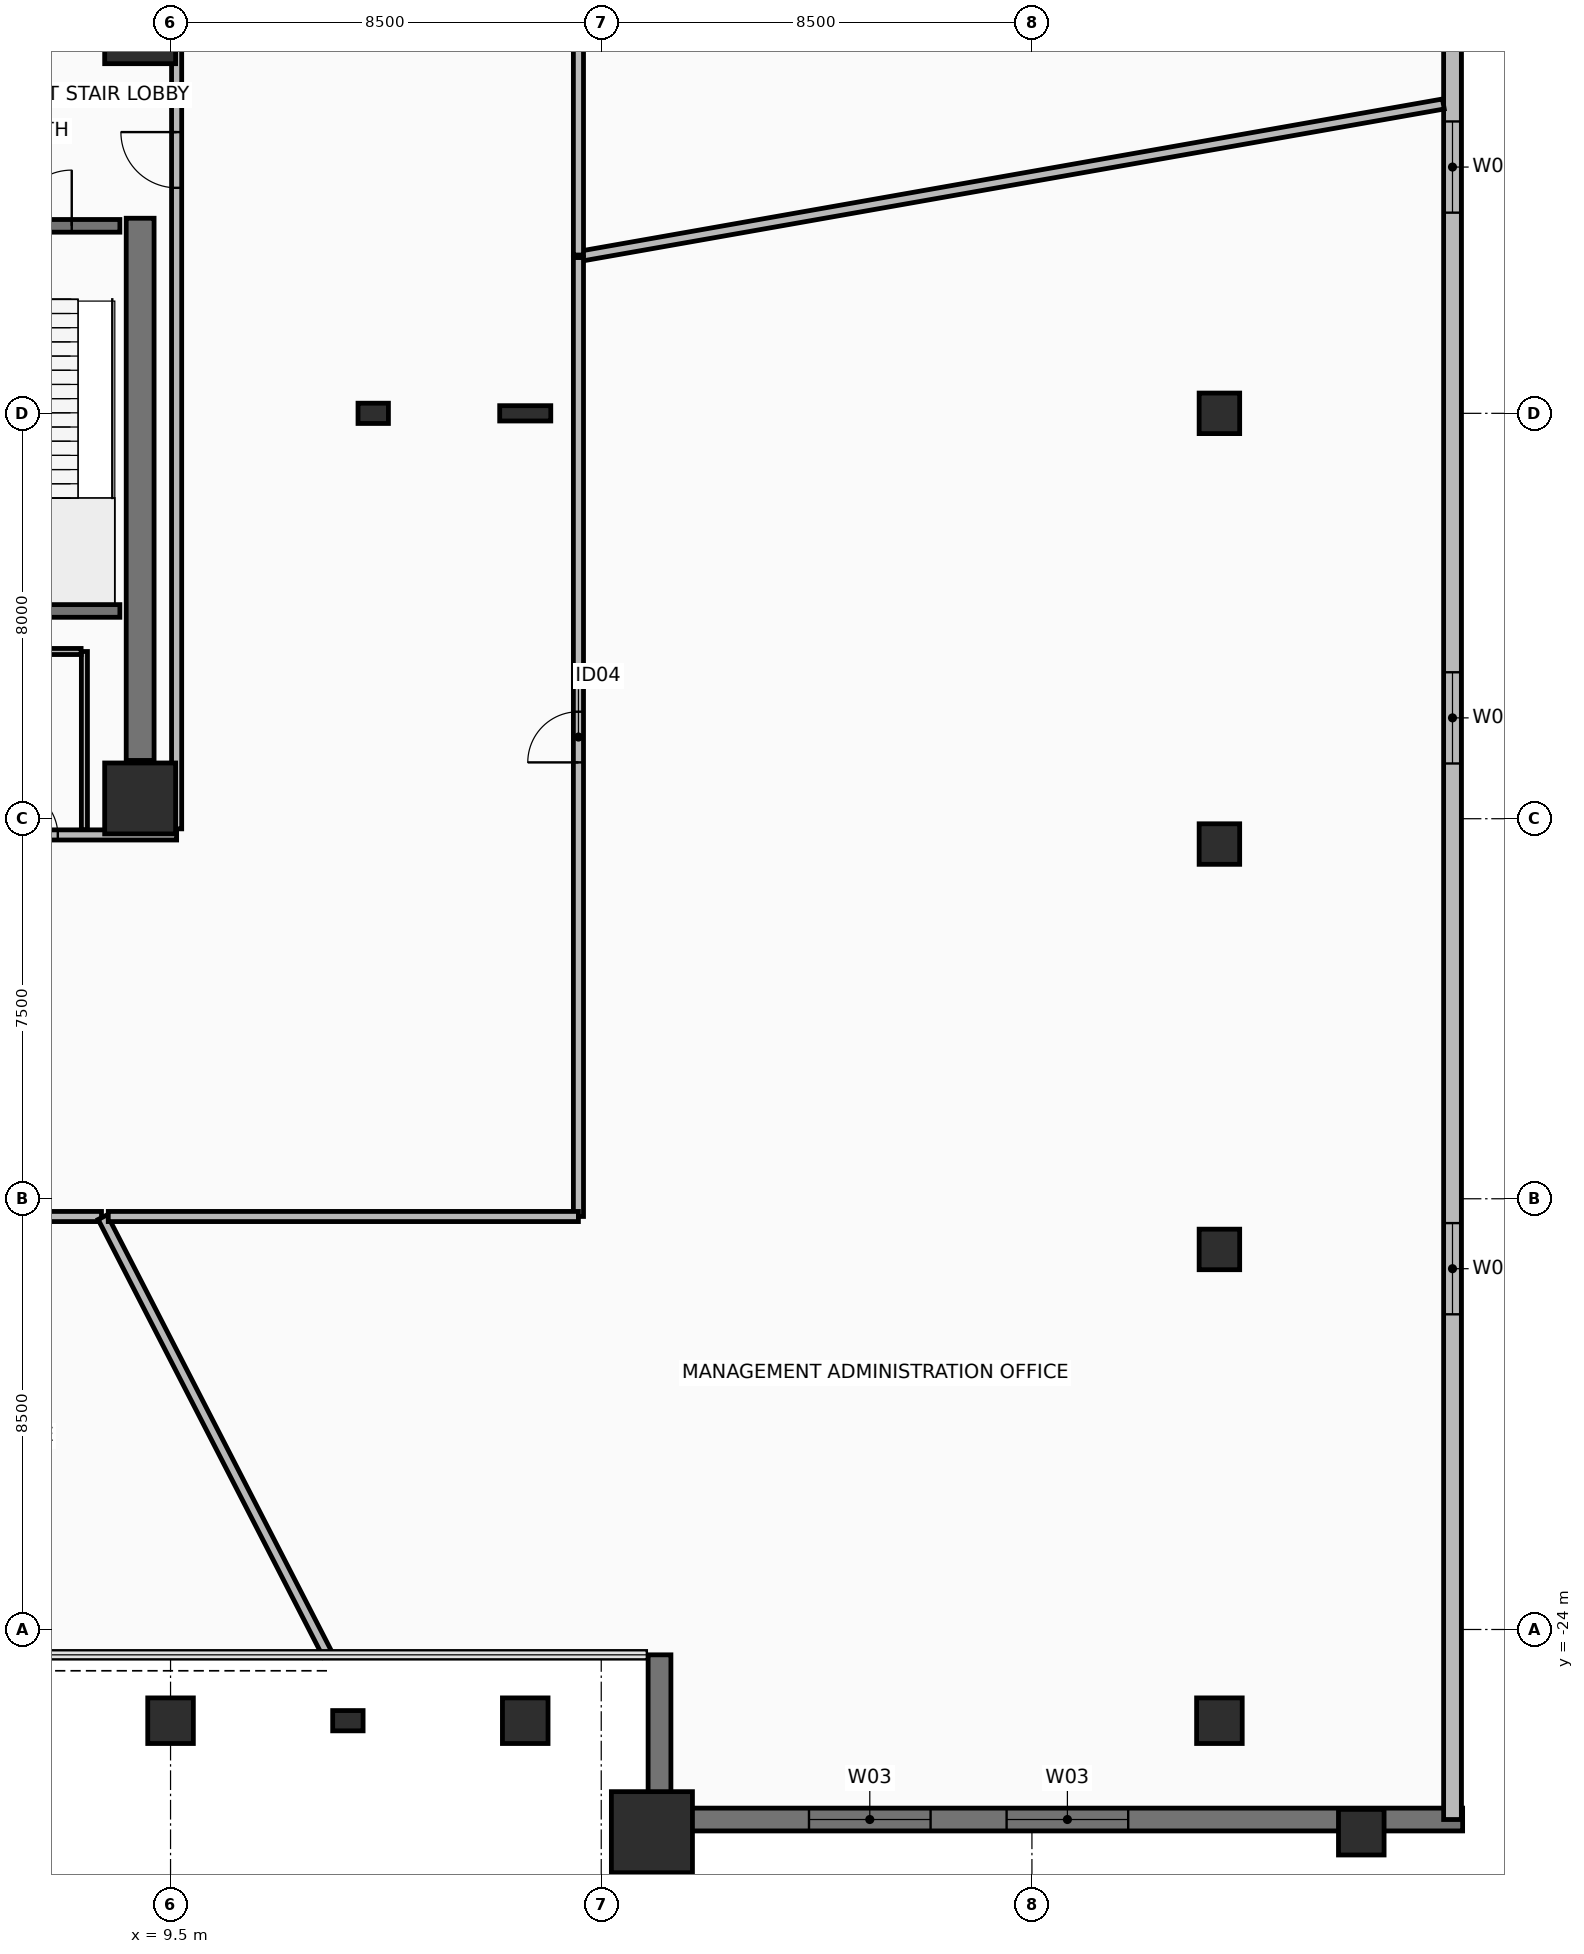
"""IFC4 building model, lengths in metres.
Left out: names, types, materials, properties, quantities, classifications, styles, units other than length and angle.
Written with IfcOpenShell. Run it as: python <this file> out.ifc"""

import sys

from ifc_helpers import new_model, si_unit, direction, frame, frame_2d, origin, origin_2d, place, context, subcontext, project, spatial, rectangle, hollow_rectangle, i_section, extrude, element, fill, save


model = new_model("IFC4")
c1 = context("Model", 3, precision=1e-05, world=origin(), true_north=direction((0.0, 1.0)))
c2 = subcontext(c1, "Body", "Model", "MODEL_VIEW")
j1 = project(units=[si_unit("LENGTHUNIT", "METRE"), si_unit("PLANEANGLEUNIT", "RADIAN")], contexts=[c1])
p1 = place(None, origin())
s1 = spatial("IfcSite", under=j1, at=p1, CompositionType="ELEMENT")
p2 = place(p1, origin())
s2 = spatial("IfcBuilding", under=s1, at=p2, CompositionType="ELEMENT")
p3 = place(p2, frame((0.0, 0.0, 5.5)))
s3 = spatial("IfcBuildingStorey", under=s2, at=p3, CompositionType="ELEMENT", Elevation=5.5)
for number, where, z_axis, x_axis in (
    (1, (8.9, -7.6, 0.0), (0.0, 0.0, 1.0), (1.0, 0.0, 0.0)),
    (2, (8.9, 7.6, 0.0), (0.0, 0.0, 1.0), (1.0, 0.0, 0.0)),
):
    element("IfcColumn", number, at=place(p3, frame(where, z_axis=z_axis, x_axis=x_axis)), inside=s3, PredefinedType="COLUMN", context=c2, shape_type="SweptSolid", body=[
        extrude(rectangle(XDim=1.4, YDim=1.4, at=origin_2d()), origin(), (0.0, 0.0, 1.0), 5.5),
    ])
for number, where, z_axis, x_axis in (
    (3, (13.5, 0.0, 0.0), (0.0, 0.0, 1.0), (1.0, 0.0, 0.0)),
    (4, (13.0, -25.8, 0.0), (0.0, 0.0, 1.0), (1.0, 0.0, 0.0)),
):
    element("IfcColumn", number, at=place(p3, frame(where, z_axis=z_axis, x_axis=x_axis)), inside=s3, PredefinedType="PILASTER", context=c2, shape_type="SweptSolid", body=[
        extrude(rectangle(XDim=0.6, YDim=0.4, at=origin_2d()), origin(), (0.0, 0.0, 1.0), 5.5),
    ])
for number, where, z_axis, x_axis in (
    (5, (9.5, -25.8, 0.0), (0.0, 0.0, 1.0), (1.0, 0.0, 0.0)),
    (6, (16.5, -25.8, 0.0), (0.0, 0.0, 1.0), (1.0, 0.0, 0.0)),
    (7, (30.2, -25.8, 0.0), (0.0, 0.0, 1.0), (1.0, 0.0, 0.0)),
):
    element("IfcColumn", number, at=place(p3, frame(where, z_axis=z_axis, x_axis=x_axis)), inside=s3, PredefinedType="COLUMN", context=c2, shape_type="SweptSolid", body=[
        extrude(hollow_rectangle(XDim=0.9, YDim=0.9, WallThickness=0.05, at=origin_2d()), origin(), (0.0, 0.0, 1.0), 5.5),
    ])
for number, where, z_axis, x_axis in (
    (8, (30.2, -16.5, 0.0), (0.0, 0.0, 1.0), (1.0, 0.0, 0.0)),
    (9, (30.2, -8.5, 0.0), (0.0, 0.0, 1.0), (1.0, 0.0, 0.0)),
    (10, (30.2, 0.0, 0.0), (0.0, 0.0, 1.0), (1.0, 0.0, 0.0)),
):
    element("IfcColumn", number, at=place(p3, frame(where, z_axis=z_axis, x_axis=x_axis)), inside=s3, PredefinedType="COLUMN", context=c2, shape_type="SweptSolid", body=[
        extrude(hollow_rectangle(XDim=0.8, YDim=0.8, WallThickness=0.045, at=origin_2d()), origin(), (0.0, 0.0, 1.0), 5.5),
    ])
p4 = place(p3, frame((16.5, 0.0, 0.0), z_axis=(0.0, 0.0, 1.0), x_axis=(1.0, 0.0, 0.0)))
e11 = element("IfcColumn", 11, at=p4, inside=s3, PredefinedType="COLUMN", context=c2, shape_type="SweptSolid", body=[
    extrude(i_section(OverallWidth=0.302, OverallDepth=1.008, WebThickness=0.021, FlangeThickness=0.04, at=origin_2d()), origin(), (0.0, 0.0, 1.0), 5.5),
])
p5 = place(p3, frame((19.0, -28.0, 0.0), z_axis=(0.0, 0.0, 1.0), x_axis=(1.0, 0.0, 0.0)))
e12 = element("IfcColumn", 12, at=p5, inside=s3, PredefinedType="COLUMN", context=c2, shape_type="SweptSolid", body=[
    extrude(rectangle(XDim=1.6, YDim=1.6, at=origin_2d()), origin(), (0.0, 0.0, 1.0), 5.5),
])
p6 = place(p3, frame((33.0, -28.0, 0.0), z_axis=(0.0, 0.0, 1.0), x_axis=(1.0, 0.0, 0.0)))
e13 = element("IfcColumn", 13, at=p6, inside=s3, PredefinedType="COLUMN", context=c2, shape_type="SweptSolid", body=[
    extrude(hollow_rectangle(XDim=0.9, YDim=0.9, WallThickness=0.05, at=origin_2d()), origin(), (0.0, 0.0, 1.0), 5.5),
])
p7 = place(p3, frame((19.4, -27.75, 0.0), z_axis=(0.0, 0.0, 1.0), x_axis=(1.0, 0.0, 0.0)))
e14 = element("IfcWall", 14, at=p7, inside=s3, PredefinedType="STANDARD", context=c2, shape_type="SweptSolid", body=[
    extrude(rectangle(XDim=15.6, YDim=0.45, at=frame_2d((7.8, 0.0))), origin(), (0.0, 0.0, 1.0), 5.22),
])
p8 = place(p7, frame((2.7, 0.0, 0.9)))
e15 = element("IfcOpeningElement", 15, at=p8, cuts=e14, PredefinedType="OPENING", context=c2, shape_type="SweptSolid", body=[
    extrude(rectangle(XDim=2.4, YDim=2.4, at=frame_2d((1.2, 1.2))), frame((0.0, 0.235, 0.0), z_axis=(0.0, -1.0, 0.0), x_axis=(1.0, 0.0, 0.0)), (0.0, 0.0, 1.0), 0.47),
])
p9 = place(p7, frame((6.6, 0.0, 0.9)))
e16 = element("IfcOpeningElement", 16, at=p9, cuts=e14, PredefinedType="OPENING", context=c2, shape_type="SweptSolid", body=[
    extrude(rectangle(XDim=2.4, YDim=2.4, at=frame_2d((1.2, 1.2))), frame((0.0, 0.235, 0.0), z_axis=(0.0, -1.0, 0.0), x_axis=(1.0, 0.0, 0.0)), (0.0, 0.0, 1.0), 0.47),
])
p10 = place(p3, frame((19.15, -24.5, 0.0), z_axis=(0.0, 0.0, 1.0), x_axis=(0.0, -1.0, 0.0)))
e17 = element("IfcWall", 17, at=p10, inside=s3, PredefinedType="STANDARD", context=c2, shape_type="SweptSolid", body=[
    extrude(rectangle(XDim=3.25, YDim=0.45, at=frame_2d((1.625, 0.0))), origin(), (0.0, 0.0, 1.0), 5.22),
])
p11 = place(p3, frame((34.8, -27.75, 0.0), z_axis=(0.0, 0.0, 1.0), x_axis=(0.0, 1.0, 0.0)))
e18 = element("IfcWall", 18, at=p11, inside=s3, PredefinedType="STANDARD", context=c2, shape_type="SweptSolid", body=[
    extrude(rectangle(XDim=54.35, YDim=0.35, at=frame_2d((27.175, 0.0))), origin(), (0.0, 0.0, 1.0), 5.22),
])
p12 = place(p11, frame((9.97, 0.0, 0.95)))
e19 = element("IfcOpeningElement", 19, at=p12, cuts=e18, PredefinedType="OPENING", context=c2, shape_type="SweptSolid", body=[
    extrude(rectangle(XDim=1.8, YDim=2.2, at=frame_2d((0.9, 1.1))), frame((0.0, 0.185, 0.0), z_axis=(0.0, -1.0, 0.0), x_axis=(1.0, 0.0, 0.0)), (0.0, 0.0, 1.0), 0.37),
])
p13 = place(p11, frame((20.84, 0.0, 0.95)))
e20 = element("IfcOpeningElement", 20, at=p13, cuts=e18, PredefinedType="OPENING", context=c2, shape_type="SweptSolid", body=[
    extrude(rectangle(XDim=1.8, YDim=2.2, at=frame_2d((0.9, 1.1))), frame((0.0, 0.185, 0.0), z_axis=(0.0, -1.0, 0.0), x_axis=(1.0, 0.0, 0.0)), (0.0, 0.0, 1.0), 0.37),
])
p14 = place(p11, frame((31.71, 0.0, 0.95)))
e21 = element("IfcOpeningElement", 21, at=p14, cuts=e18, PredefinedType="OPENING", context=c2, shape_type="SweptSolid", body=[
    extrude(rectangle(XDim=1.8, YDim=2.2, at=frame_2d((0.9, 1.1))), frame((0.0, 0.185, 0.0), z_axis=(0.0, -1.0, 0.0), x_axis=(1.0, 0.0, 0.0)), (0.0, 0.0, 1.0), 0.37),
])
p15 = place(p11, frame((42.58, 0.0, 0.95)))
e22 = element("IfcOpeningElement", 22, at=p15, cuts=e18, PredefinedType="OPENING", context=c2, shape_type="SweptSolid", body=[
    extrude(rectangle(XDim=1.8, YDim=2.2, at=frame_2d((0.9, 1.1))), frame((0.0, 0.185, 0.0), z_axis=(0.0, -1.0, 0.0), x_axis=(1.0, 0.0, 0.0)), (0.0, 0.0, 1.0), 0.37),
])
p16 = place(p3, frame((8.9, -6.85, 0.0), z_axis=(0.0, 0.0, 1.0), x_axis=(0.0, 1.0, 0.0)))
e23 = element("IfcWall", 23, at=p16, inside=s3, PredefinedType="SHEAR", context=c2, shape_type="SweptSolid", body=[
    extrude(rectangle(XDim=10.7, YDim=0.55, at=frame_2d((5.35, 0.0))), origin(), (0.0, 0.0, 1.0), 5.22),
])
p17 = place(p3, frame((-9.62, -8.32, 0.0), z_axis=(0.0, 0.0, 1.0), x_axis=(1.0, 0.0, 0.0)))
e24 = element("IfcWall", 24, at=p17, inside=s3, PredefinedType="PARTITIONING", context=c2, shape_type="SweptSolid", body=[
    extrude(rectangle(XDim=19.24, YDim=0.2, at=frame_2d((9.62, 0.0))), origin(), (0.0, 0.0, 1.0), 4.565),
])
p18 = place(p17, frame((14.045, 0.0, 0.0)))
e25 = element("IfcOpeningElement", 25, at=p18, cuts=e24, PredefinedType="OPENING", context=c2, shape_type="SweptSolid", body=[
    extrude(rectangle(XDim=0.9, YDim=2.1, at=frame_2d((0.45, 1.05))), frame((0.0, 0.11, 0.0), z_axis=(0.0, -1.0, 0.0), x_axis=(1.0, 0.0, 0.0)), (0.0, 0.0, 1.0), 0.22),
])
p19 = place(p17, frame((15.995, 0.0, 0.0)))
e26 = element("IfcOpeningElement", 26, at=p19, cuts=e24, PredefinedType="OPENING", context=c2, shape_type="SweptSolid", body=[
    extrude(rectangle(XDim=0.9, YDim=2.1, at=frame_2d((0.45, 1.05))), frame((0.0, 0.11, 0.0), z_axis=(0.0, -1.0, 0.0), x_axis=(1.0, 0.0, 0.0)), (0.0, 0.0, 1.0), 0.22),
])
p20 = place(p3, frame((9.62, -8.2, 0.0), z_axis=(0.0, 0.0, 1.0), x_axis=(0.0, 1.0, 0.0)))
e27 = element("IfcWall", 27, at=p20, inside=s3, PredefinedType="PARTITIONING", context=c2, shape_type="SweptSolid", body=[
    extrude(rectangle(XDim=16.4, YDim=0.2, at=frame_2d((8.2, 0.0))), origin(), (0.0, 0.0, 1.0), 4.565),
])
p21 = place(p20, frame((12.65, 0.0, 0.0)))
e28 = element("IfcOpeningElement", 28, at=p21, cuts=e27, PredefinedType="OPENING", context=c2, shape_type="SweptSolid", body=[
    extrude(rectangle(XDim=1.1, YDim=2.15, at=frame_2d((0.55, 1.075))), frame((0.0, 0.11, 0.0), z_axis=(0.0, -1.0, 0.0), x_axis=(1.0, 0.0, 0.0)), (0.0, 0.0, 1.0), 0.22),
])
p22 = place(p3, frame((5.5, 3.7, 0.0), z_axis=(0.0, 0.0, 1.0), x_axis=(1.0, 0.0, 0.0)))
e29 = element("IfcWall", 29, at=p22, inside=s3, PredefinedType="SHEAR", context=c2, shape_type="SweptSolid", body=[
    extrude(rectangle(XDim=3.0, YDim=0.25, at=frame_2d((1.5, 0.0))), origin(), (0.0, 0.0, 1.0), 5.22),
])
p23 = place(p22, frame((0.95, 0.0, 0.0)))
e30 = element("IfcOpeningElement", 30, at=p23, cuts=e29, PredefinedType="OPENING", context=c2, shape_type="SweptSolid", body=[
    extrude(rectangle(XDim=1.1, YDim=2.15, at=frame_2d((0.55, 1.075))), frame((0.0, 0.135, 0.0), z_axis=(0.0, -1.0, 0.0), x_axis=(1.0, 0.0, 0.0)), (0.0, 0.0, 1.0), 0.27),
])
p24 = place(p3, frame((5.5, -3.9, 0.0), z_axis=(0.0, 0.0, 1.0), x_axis=(1.0, 0.0, 0.0)))
e31 = element("IfcWall", 31, at=p24, inside=s3, PredefinedType="SHEAR", context=c2, shape_type="SweptSolid", body=[
    extrude(rectangle(XDim=3.0, YDim=0.25, at=frame_2d((1.5, 0.0))), origin(), (0.0, 0.0, 1.0), 5.22),
])
p25 = place(p3, frame((7.8, -8.215, 0.0), z_axis=(0.0, 0.0, 1.0), x_axis=(0.0, 1.0, 0.0)))
e32 = element("IfcWall", 32, at=p25, inside=s3, PredefinedType="PARTITIONING", context=c2, shape_type="SweptSolid", body=[
    extrude(rectangle(XDim=3.515, YDim=0.12, at=frame_2d((1.758, 0.0))), origin(), (0.0, 0.0, 1.0), 4.415),
])
p26 = place(p3, frame((7.735, -4.7, 0.0), z_axis=(0.0, 0.0, 1.0), x_axis=(-1.0, 0.0, 0.0)))
e33 = element("IfcWall", 33, at=p26, inside=s3, PredefinedType="PARTITIONING", context=c2, shape_type="SweptSolid", body=[
    extrude(rectangle(XDim=1.82, YDim=0.12, at=frame_2d((0.91, 0.0))), origin(), (0.0, 0.0, 1.0), 5.22),
])
p27 = place(p3, frame((34.62, 6.104, 0.0), z_axis=(0.0, 0.0, 1.0), x_axis=(-0.984806418521, -0.173655745772, 0.0)))
e34 = element("IfcWall", 34, at=p27, inside=s3, PredefinedType="PARTITIONING", context=c2, shape_type="SweptSolid", body=[
    extrude(rectangle(XDim=17.304, YDim=0.2, at=frame_2d((8.652, 0.0))), origin(), (0.0, 0.0, 1.0), 4.415),
])
p28 = place(p3, frame((17.55, 3.124, 0.0), z_axis=(0.0, 0.0, 1.0), x_axis=(0.0, 1.0, 0.0)))
e35 = element("IfcWall", 35, at=p28, inside=s3, PredefinedType="PARTITIONING", context=c2, shape_type="SweptSolid", body=[
    extrude(rectangle(XDim=5.651, YDim=0.2, at=frame_2d((2.825, 0.0))), origin(), (0.0, 0.0, 1.0), 4.565),
])
p29 = place(p3, frame((-8.137, -15.85, 0.0), z_axis=(0.0, 0.0, 1.0), x_axis=(1.0, 0.0, 0.0)))
e36 = element("IfcWall", 36, at=p29, inside=s3, PredefinedType="PARTITIONING", context=c2, shape_type="SweptSolid", body=[
    extrude(rectangle(XDim=16.275, YDim=0.2, at=frame_2d((8.137, 0.0))), origin(), (0.0, 0.0, 1.0), 4.565),
])
p30 = place(p29, frame((7.537, 0.0, 0.0)))
e37 = element("IfcOpeningElement", 37, at=p30, cuts=e36, PredefinedType="OPENING", context=c2, shape_type="SweptSolid", body=[
    extrude(rectangle(XDim=1.2, YDim=2.15, at=frame_2d((0.6, 1.075))), frame((0.0, 0.11, 0.0), z_axis=(0.0, -1.0, 0.0), x_axis=(1.0, 0.0, 0.0)), (0.0, 0.0, 1.0), 0.22),
])
p31 = place(p3, frame((8.16, -15.864, 0.0), z_axis=(0.0, 0.0, 1.0), x_axis=(0.457390612437, -0.889265892551, 0.0)))
e38 = element("IfcWall", 38, at=p31, inside=s3, PredefinedType="PARTITIONING", context=c2, shape_type="SweptSolid", body=[
    extrude(rectangle(XDim=9.712, YDim=0.2, at=frame_2d((4.856, 0.0))), origin(), (0.0, 0.0, 1.0), 4.565),
])
p32 = place(p3, frame((17.55, -15.849, 0.0), z_axis=(0.0, 0.0, 1.0), x_axis=(0.0, 1.0, 0.0)))
e39 = element("IfcWall", 39, at=p32, inside=s3, PredefinedType="PARTITIONING", context=c2, shape_type="SweptSolid", body=[
    extrude(rectangle(XDim=18.923, YDim=0.2, at=frame_2d((9.461, 0.0))), origin(), (0.0, 0.0, 1.0), 4.565),
])
p33 = place(p32, frame((8.961, 0.0, 0.0)))
e40 = element("IfcOpeningElement", 40, at=p33, cuts=e39, PredefinedType="OPENING", context=c2, shape_type="SweptSolid", body=[
    extrude(rectangle(XDim=1.0, YDim=2.15, at=frame_2d((0.5, 1.075))), frame((0.0, 0.11, 0.0), z_axis=(0.0, -1.0, 0.0), x_axis=(1.0, 0.0, 0.0)), (0.0, 0.0, 1.0), 0.22),
])
p34 = place(p3, frame((8.271, -15.85, 0.0), z_axis=(0.0, 0.0, 1.0), x_axis=(1.0, 0.0, 0.0)))
e41 = element("IfcWall", 41, at=p34, inside=s3, PredefinedType="PARTITIONING", context=c2, shape_type="SweptSolid", body=[
    extrude(rectangle(XDim=9.278, YDim=0.2, at=frame_2d((4.639, 0.0))), origin(), (0.0, 0.0, 1.0), 4.565),
])
p35 = place(p8, origin())
e42 = element("IfcWindow", 42, at=p35, inside=s3, PartitioningType="SINGLE_PANEL", PredefinedType="WINDOW", context=c2, shape_type="SweptSolid", body=[
    extrude(rectangle(XDim=2.4, YDim=2.4, at=frame_2d((1.2, 1.2))), frame((0.0, 0.03, 0.0), z_axis=(0.0, -1.0, 0.0), x_axis=(1.0, 0.0, 0.0)), (0.0, 0.0, 1.0), 0.06),
])
fill(e15, e42)
p36 = place(p9, origin())
e43 = element("IfcWindow", 43, at=p36, inside=s3, PartitioningType="SINGLE_PANEL", PredefinedType="WINDOW", context=c2, shape_type="SweptSolid", body=[
    extrude(rectangle(XDim=2.4, YDim=2.4, at=frame_2d((1.2, 1.2))), frame((0.0, 0.03, 0.0), z_axis=(0.0, -1.0, 0.0), x_axis=(1.0, 0.0, 0.0)), (0.0, 0.0, 1.0), 0.06),
])
fill(e16, e43)
p37 = place(p12, origin())
e44 = element("IfcWindow", 44, at=p37, inside=s3, PartitioningType="SINGLE_PANEL", PredefinedType="WINDOW", context=c2, shape_type="SweptSolid", body=[
    extrude(rectangle(XDim=1.8, YDim=2.2, at=frame_2d((0.9, 1.1))), frame((0.0, 0.03, 0.0), z_axis=(0.0, -1.0, 0.0), x_axis=(1.0, 0.0, 0.0)), (0.0, 0.0, 1.0), 0.06),
])
fill(e19, e44)
p38 = place(p13, origin())
e45 = element("IfcWindow", 45, at=p38, inside=s3, PartitioningType="SINGLE_PANEL", PredefinedType="WINDOW", context=c2, shape_type="SweptSolid", body=[
    extrude(rectangle(XDim=1.8, YDim=2.2, at=frame_2d((0.9, 1.1))), frame((0.0, 0.03, 0.0), z_axis=(0.0, -1.0, 0.0), x_axis=(1.0, 0.0, 0.0)), (0.0, 0.0, 1.0), 0.06),
])
fill(e20, e45)
p39 = place(p14, origin())
e46 = element("IfcWindow", 46, at=p39, inside=s3, PartitioningType="SINGLE_PANEL", PredefinedType="WINDOW", context=c2, shape_type="SweptSolid", body=[
    extrude(rectangle(XDim=1.8, YDim=2.2, at=frame_2d((0.9, 1.1))), frame((0.0, 0.03, 0.0), z_axis=(0.0, -1.0, 0.0), x_axis=(1.0, 0.0, 0.0)), (0.0, 0.0, 1.0), 0.06),
])
fill(e21, e46)
p40 = place(p21, frame((1.1, 0.0, 0.0), z_axis=(0.0, 0.0, 1.0), x_axis=(-1.0, 0.0, 0.0)))
e47 = element("IfcDoor", 47, at=p40, inside=s3, OperationType="SINGLE_SWING_LEFT", PredefinedType="DOOR", context=c2, shape_type="SweptSolid", body=[
    extrude(rectangle(XDim=1.1, YDim=2.15, at=frame_2d((0.55, 1.075))), frame((0.0, 0.025, 0.0), z_axis=(0.0, -1.0, 0.0), x_axis=(1.0, 0.0, 0.0)), (0.0, 0.0, 1.0), 0.05),
])
fill(e28, e47)
p41 = place(p23, frame((1.1, 0.0, 0.0), z_axis=(0.0, 0.0, 1.0), x_axis=(-1.0, 0.0, 0.0)))
e48 = element("IfcDoor", 48, at=p41, inside=s3, OperationType="SINGLE_SWING_LEFT", PredefinedType="DOOR", context=c2, shape_type="SweptSolid", body=[
    extrude(rectangle(XDim=1.1, YDim=2.15, at=frame_2d((0.55, 1.075))), frame((0.0, 0.025, 0.0), z_axis=(0.0, -1.0, 0.0), x_axis=(1.0, 0.0, 0.0)), (0.0, 0.0, 1.0), 0.05),
])
fill(e30, e48)
p42 = place(p19, origin())
e49 = element("IfcDoor", 49, at=p42, inside=s3, OperationType="SINGLE_SWING_LEFT", PredefinedType="DOOR", context=c2, shape_type="SweptSolid", body=[
    extrude(rectangle(XDim=0.9, YDim=2.1, at=frame_2d((0.45, 1.05))), frame((0.0, 0.025, 0.0), z_axis=(0.0, -1.0, 0.0), x_axis=(1.0, 0.0, 0.0)), (0.0, 0.0, 1.0), 0.05),
])
fill(e26, e49)
p43 = place(p33, origin())
e50 = element("IfcDoor", 50, at=p43, inside=s3, OperationType="SINGLE_SWING_RIGHT", PredefinedType="DOOR", context=c2, shape_type="SweptSolid", body=[
    extrude(rectangle(XDim=1.0, YDim=2.15, at=frame_2d((0.5, 1.075))), frame((0.0, 0.025, 0.0), z_axis=(0.0, -1.0, 0.0), x_axis=(1.0, 0.0, 0.0)), (0.0, 0.0, 1.0), 0.05),
])
fill(e40, e50)
save(model, sys.argv[1])
